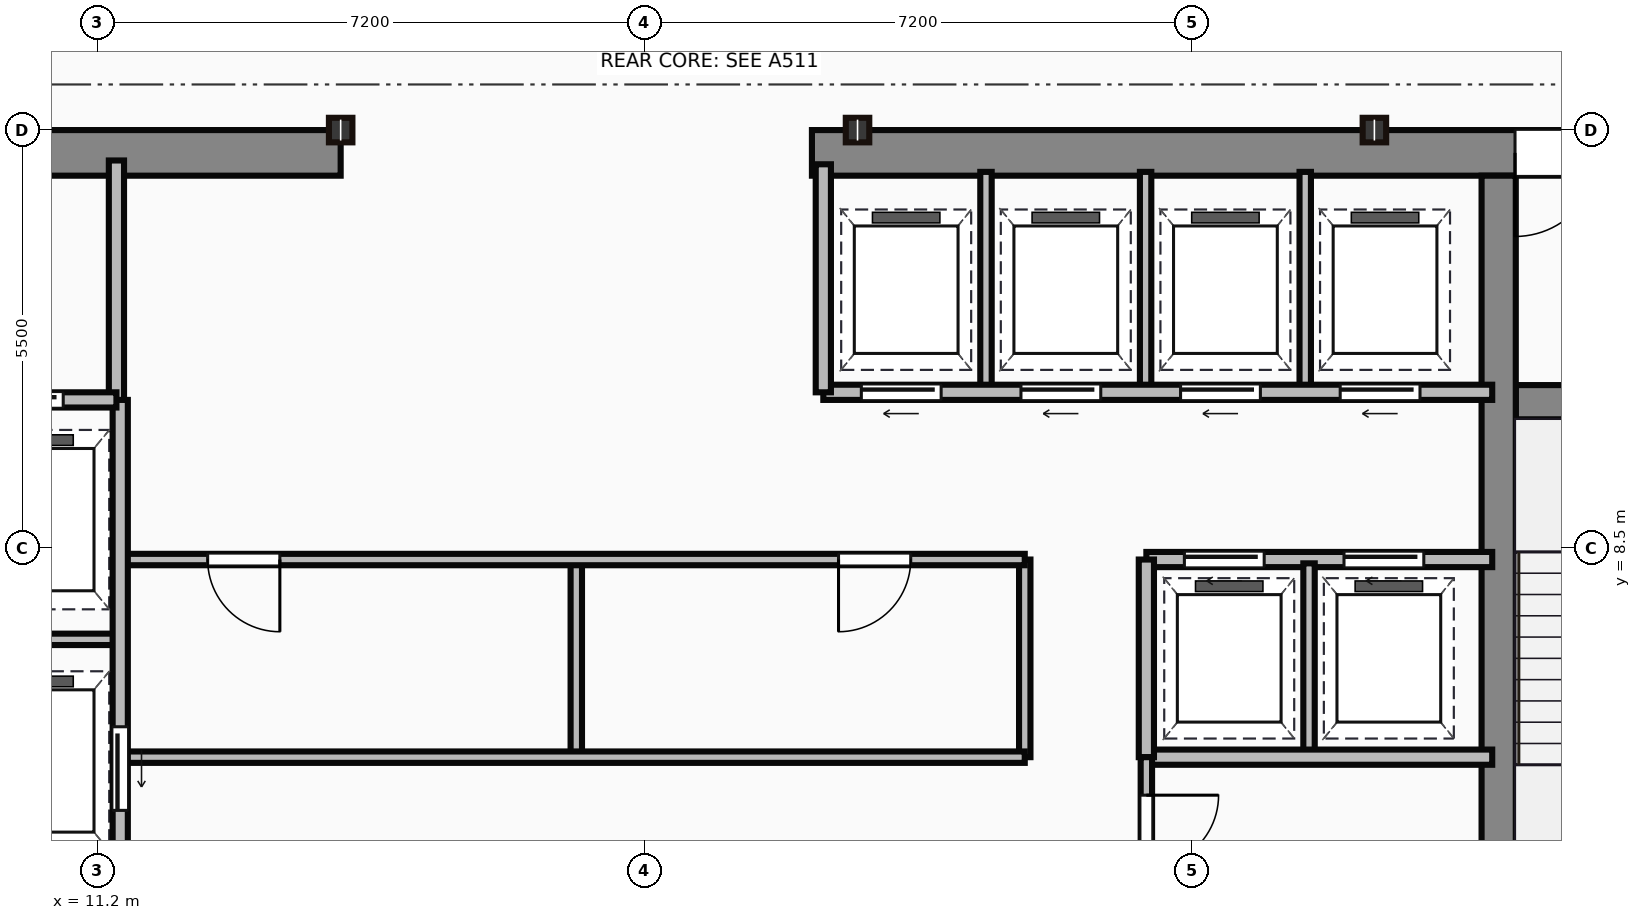
"""IFC4 building model, lengths in metres.
Left out: names, types, materials, properties, quantities, classifications, styles, units other than length and angle.
Written with IfcOpenShell. Run it as: python <this file> out.ifc"""

import sys

from ifc_helpers import new_model, si_unit, direction, frame, frame_2d, origin, origin_2d, place, context, subcontext, project, spatial, rectangle, i_section, extrude, source, transform, mapped, element, fill, save


model = new_model("IFC4")
c1 = context("Model", 3, precision=1e-05, world=origin(), true_north=direction((0.0, 1.0)))
c2 = subcontext(c1, "Body", "Model", "MODEL_VIEW")
j1 = project(units=[si_unit("LENGTHUNIT", "METRE"), si_unit("PLANEANGLEUNIT", "RADIAN")], contexts=[c1])
p1 = place(None, origin())
s1 = spatial("IfcSite", under=j1, at=p1, CompositionType="ELEMENT")
p2 = place(p1, origin())
s2 = spatial("IfcBuilding", under=s1, at=p2, CompositionType="ELEMENT")
p3 = place(p2, frame((0.0, 0.0, 266.1)))
s3 = spatial("IfcBuildingStorey", under=s2, at=p3, CompositionType="ELEMENT", Elevation=266.1)
m1 = source(origin(), c2, "Body", "SweptSolid", [
    extrude(rectangle(XDim=9.1, YDim=0.6, at=frame_2d((4.55, 0.0))), origin(), (0.0, 0.0, 1.0), 3.65),
])
p4 = place(p3, frame((5.3, 13.7, 0.0), z_axis=(0.0, 0.0, 1.0), x_axis=(1.0, 0.0, 0.0)))
e1 = element("IfcWall", 1, at=p4, inside=s3, PredefinedType="SHEAR", context=c2, shape_type="MappedRepresentation", body=[
    mapped(m1, transform((0.0, 0.0, 0.0))),
])
p5 = place(p4, frame((4.1, 0.0, 0.0)))
e2 = element("IfcOpeningElement", 2, at=p5, cuts=e1, PredefinedType="OPENING", context=c2, shape_type="SweptSolid", body=[
    extrude(rectangle(XDim=1.1, YDim=2.15, at=frame_2d((0.55, 1.075))), frame((0.0, 0.31, 0.0), z_axis=(0.0, -1.0, 0.0), x_axis=(1.0, 0.0, 0.0)), (0.0, 0.0, 1.0), 0.62),
])
m2 = source(origin(), c2, "Body", "SweptSolid", [
    extrude(rectangle(XDim=12.6, YDim=0.6, at=frame_2d((6.3, 0.0))), origin(), (0.0, 0.0, 1.0), 3.65),
])
p6 = place(p3, frame((20.6, 13.7, 0.0), z_axis=(0.0, 0.0, 1.0), x_axis=(1.0, 0.0, 0.0)))
e3 = element("IfcWall", 3, at=p6, inside=s3, PredefinedType="SHEAR", context=c2, shape_type="MappedRepresentation", body=[
    mapped(m2, transform((0.0, 0.0, 0.0))),
])
p7 = place(p6, frame((9.25, 0.0, 0.0)))
e4 = element("IfcOpeningElement", 4, at=p7, cuts=e3, PredefinedType="OPENING", context=c2, shape_type="SweptSolid", body=[
    extrude(rectangle(XDim=1.1, YDim=2.15, at=frame_2d((0.55, 1.075))), frame((0.0, 0.31, 0.0), z_axis=(0.0, -1.0, 0.0), x_axis=(1.0, 0.0, 0.0)), (0.0, 0.0, 1.0), 0.62),
])
m3 = source(origin(), c2, "Body", "SweptSolid", [
    extrude(rectangle(XDim=12.5, YDim=0.45, at=frame_2d((6.25, 0.0))), origin(), (0.0, 0.0, 1.0), 3.65),
])
p8 = place(p3, frame((29.635, 0.9, 0.0), z_axis=(0.0, 0.0, 1.0), x_axis=(0.0, 1.0, 0.0)))
e5 = element("IfcWall", 5, at=p8, inside=s3, PredefinedType="SHEAR", context=c2, shape_type="MappedRepresentation", body=[
    mapped(m3, transform((0.0, 0.0, 0.0))),
])
m4 = source(origin(), c2, "Body", "SweptSolid", [
    extrude(rectangle(XDim=3.39, YDim=0.45, at=frame_2d((1.695, 0.0))), origin(), (0.0, 0.0, 1.0), 3.65),
])
p9 = place(p3, frame((29.86, 10.42, 0.0), z_axis=(0.0, 0.0, 1.0), x_axis=(1.0, 0.0, 0.0)))
e6 = element("IfcWall", 6, at=p9, inside=s3, PredefinedType="SHEAR", context=c2, shape_type="MappedRepresentation", body=[
    mapped(m4, transform((0.0, 0.0, 0.0))),
])
p10 = place(p9, frame((1.1, 0.0, 0.0)))
e7 = element("IfcOpeningElement", 7, at=p10, cuts=e6, PredefinedType="OPENING", context=c2, shape_type="SweptSolid", body=[
    extrude(rectangle(XDim=1.1, YDim=2.15, at=frame_2d((0.55, 1.075))), frame((0.0, 0.235, 0.0), z_axis=(0.0, -1.0, 0.0), x_axis=(1.0, 0.0, 0.0)), (0.0, 0.0, 1.0), 0.47),
])
m5 = source(origin(), c2, "Body", "SweptSolid", [
    extrude(i_section(OverallWidth=0.309, OverallDepth=0.323, WebThickness=0.014, FlangeThickness=0.023, at=origin_2d()), origin(), (0.0, 0.0, 1.0), 3.65),
])
for number, where, z_axis, x_axis in (
    (8, (14.4, 14.0, 0.0), (0.0, 0.0, 1.0), (1.0, 0.0, 0.0)),
    (9, (21.2, 14.0, 0.0), (0.0, 0.0, 1.0), (1.0, 0.0, 0.0)),
    (10, (28.0, 14.0, 0.0), (0.0, 0.0, 1.0), (1.0, 0.0, 0.0)),
):
    element("IfcColumn", number, at=place(p3, frame(where, z_axis=z_axis, x_axis=x_axis)), inside=s3, PredefinedType="COLUMN", context=c2, shape_type="MappedRepresentation", body=[
        mapped(m5, transform((0.0, 0.0, 0.0))),
    ])
m6 = source(origin(), c2, "Body", "SweptSolid", [
    extrude(rectangle(XDim=3.18, YDim=0.2, at=frame_2d((1.59, 0.0))), origin(), (0.0, 0.0, 1.0), 3.4),
])
p11 = place(p3, frame((11.45, 10.42, 0.0), z_axis=(0.0, 0.0, 1.0), x_axis=(0.0, 1.0, 0.0)))
e11 = element("IfcWall", 11, at=p11, inside=s3, PredefinedType="PARTITIONING", context=c2, shape_type="MappedRepresentation", body=[
    mapped(m6, transform((0.0, 0.0, 0.0))),
])
m7 = source(origin(), c2, "Body", "SweptSolid", [
    extrude(rectangle(XDim=2.35, YDim=0.2, at=frame_2d((1.175, 0.0))), origin(), (0.0, 0.0, 1.0), 3.4),
])
p12 = place(p3, frame((9.1, 10.45, 0.0), z_axis=(0.0, 0.0, 1.0), x_axis=(1.0, 0.0, 0.0)))
e12 = element("IfcWall", 12, at=p12, inside=s3, PredefinedType="PARTITIONING", context=c2, shape_type="MappedRepresentation", body=[
    mapped(m7, transform((0.0, 0.0, 0.0))),
])
p13 = place(p12, frame((0.55, 0.0, 0.0)))
e13 = element("IfcOpeningElement", 13, at=p13, cuts=e12, PredefinedType="OPENING", context=c2, shape_type="SweptSolid", body=[
    extrude(rectangle(XDim=1.1, YDim=2.15, at=frame_2d((0.55, 1.075))), frame((0.0, 0.11, 0.0), z_axis=(0.0, -1.0, 0.0), x_axis=(1.0, 0.0, 0.0)), (0.0, 0.0, 1.0), 0.22),
])
m8 = source(origin(), c2, "Body", "SweptSolid", [
    extrude(rectangle(XDim=9.6, YDim=0.2, at=frame_2d((4.8, 0.0))), origin(), (0.0, 0.0, 1.0), 3.4),
])
p14 = place(p3, frame((11.5, 0.85, 0.0), z_axis=(0.0, 0.0, 1.0), x_axis=(0.0, 1.0, 0.0)))
e14 = element("IfcWall", 14, at=p14, inside=s3, PredefinedType="PARTITIONING", context=c2, shape_type="MappedRepresentation", body=[
    mapped(m8, transform((0.0, 0.0, 0.0))),
])
p15 = place(p14, frame((4.2, 0.0, 0.0)))
e15 = element("IfcOpeningElement", 15, at=p15, cuts=e14, PredefinedType="OPENING", context=c2, shape_type="SweptSolid", body=[
    extrude(rectangle(XDim=1.1, YDim=2.15, at=frame_2d((0.55, 1.075))), frame((0.0, 0.11, 0.0), z_axis=(0.0, -1.0, 0.0), x_axis=(1.0, 0.0, 0.0)), (0.0, 0.0, 1.0), 0.22),
])
p16 = place(p14, frame((0.9, 0.0, 0.0)))
e16 = element("IfcOpeningElement", 16, at=p16, cuts=e14, PredefinedType="OPENING", context=c2, shape_type="SweptSolid", body=[
    extrude(rectangle(XDim=1.2, YDim=2.15, at=frame_2d((0.6, 1.075))), frame((0.0, 0.11, 0.0), z_axis=(0.0, -1.0, 0.0), x_axis=(1.0, 0.0, 0.0)), (0.0, 0.0, 1.0), 0.22),
])
m9 = source(origin(), c2, "Body", "SweptSolid", [
    extrude(rectangle(XDim=2.4, YDim=0.15, at=frame_2d((1.2, 0.0))), origin(), (0.0, 0.0, 1.0), 3.4),
])
p17 = place(p3, frame((9.1, 7.3, 0.0), z_axis=(0.0, 0.0, 1.0), x_axis=(1.0, 0.0, 0.0)))
e17 = element("IfcWall", 17, at=p17, inside=s3, PredefinedType="PARTITIONING", context=c2, shape_type="MappedRepresentation", body=[
    mapped(m9, transform((0.0, 0.0, 0.0))),
])
m10 = source(origin(), c2, "Body", "SweptSolid", [
    extrude(rectangle(XDim=11.85, YDim=0.15, at=frame_2d((5.925, 0.0))), origin(), (0.0, 0.0, 1.0), 3.4),
])
p18 = place(p3, frame((11.55, 5.75, 0.0), z_axis=(0.0, 0.0, 1.0), x_axis=(1.0, 0.0, 0.0)))
e18 = element("IfcWall", 18, at=p18, inside=s3, PredefinedType="PARTITIONING", context=c2, shape_type="MappedRepresentation", body=[
    mapped(m10, transform((0.0, 0.0, 0.0))),
])
p19 = place(p3, frame((11.55, 8.35, 0.0), z_axis=(0.0, 0.0, 1.0), x_axis=(1.0, 0.0, 0.0)))
e19 = element("IfcWall", 19, at=p19, inside=s3, PredefinedType="PARTITIONING", context=c2, shape_type="MappedRepresentation", body=[
    mapped(m10, transform((0.0, 0.0, 0.0))),
])
p20 = place(p19, frame((1.1, 0.0, 0.0)))
e20 = element("IfcOpeningElement", 20, at=p20, cuts=e19, PredefinedType="OPENING", context=c2, shape_type="SweptSolid", body=[
    extrude(rectangle(XDim=0.95, YDim=2.15, at=frame_2d((0.475, 1.075))), frame((0.0, 0.085, 0.0), z_axis=(0.0, -1.0, 0.0), x_axis=(1.0, 0.0, 0.0)), (0.0, 0.0, 1.0), 0.17),
])
p21 = place(p19, frame((9.4, 0.0, 0.0)))
e21 = element("IfcOpeningElement", 21, at=p21, cuts=e19, PredefinedType="OPENING", context=c2, shape_type="SweptSolid", body=[
    extrude(rectangle(XDim=0.95, YDim=2.15, at=frame_2d((0.475, 1.075))), frame((0.0, 0.085, 0.0), z_axis=(0.0, -1.0, 0.0), x_axis=(1.0, 0.0, 0.0)), (0.0, 0.0, 1.0), 0.17),
])
m11 = source(origin(), c2, "Body", "SweptSolid", [
    extrude(rectangle(XDim=2.6, YDim=0.15, at=frame_2d((1.3, 0.0))), origin(), (0.0, 0.0, 1.0), 3.4),
])
p22 = place(p3, frame((23.4, 5.75, 0.0), z_axis=(0.0, 0.0, 1.0), x_axis=(0.0, 1.0, 0.0)))
e22 = element("IfcWall", 22, at=p22, inside=s3, PredefinedType="PARTITIONING", context=c2, shape_type="MappedRepresentation", body=[
    mapped(m11, transform((0.0, 0.0, 0.0))),
])
m12 = source(origin(), c2, "Body", "SweptSolid", [
    extrude(rectangle(XDim=2.5, YDim=0.15, at=frame_2d((1.25, 0.0))), origin(), (0.0, 0.0, 1.0), 3.4),
])
p23 = place(p3, frame((17.5, 5.8, 0.0), z_axis=(0.0, 0.0, 1.0), x_axis=(0.0, 1.0, 0.0)))
e23 = element("IfcWall", 23, at=p23, inside=s3, PredefinedType="PARTITIONING", context=c2, shape_type="MappedRepresentation", body=[
    mapped(m12, transform((0.0, 0.0, 0.0))),
])
m13 = source(origin(), c2, "Body", "SweptSolid", [
    extrude(rectangle(XDim=8.8, YDim=0.2, at=frame_2d((4.4, 0.0))), origin(), (0.0, 0.0, 1.0), 3.4),
])
p24 = place(p3, frame((20.75, 10.55, 0.0), z_axis=(0.0, 0.0, 1.0), x_axis=(1.0, 0.0, 0.0)))
e24 = element("IfcWall", 24, at=p24, inside=s3, PredefinedType="PARTITIONING", context=c2, shape_type="MappedRepresentation", body=[
    mapped(m13, transform((0.0, 0.0, 0.0))),
])
p25 = place(p24, frame((0.5, 0.0, 0.0)))
e25 = element("IfcOpeningElement", 25, at=p25, cuts=e24, PredefinedType="OPENING", context=c2, shape_type="SweptSolid", body=[
    extrude(rectangle(XDim=1.05, YDim=2.15, at=frame_2d((0.525, 1.075))), frame((0.0, 0.11, 0.0), z_axis=(0.0, -1.0, 0.0), x_axis=(1.0, 0.0, 0.0)), (0.0, 0.0, 1.0), 0.22),
])
p26 = place(p24, frame((2.6, 0.0, 0.0)))
e26 = element("IfcOpeningElement", 26, at=p26, cuts=e24, PredefinedType="OPENING", context=c2, shape_type="SweptSolid", body=[
    extrude(rectangle(XDim=1.05, YDim=2.15, at=frame_2d((0.525, 1.075))), frame((0.0, 0.11, 0.0), z_axis=(0.0, -1.0, 0.0), x_axis=(1.0, 0.0, 0.0)), (0.0, 0.0, 1.0), 0.22),
])
p27 = place(p24, frame((4.7, 0.0, 0.0)))
e27 = element("IfcOpeningElement", 27, at=p27, cuts=e24, PredefinedType="OPENING", context=c2, shape_type="SweptSolid", body=[
    extrude(rectangle(XDim=1.05, YDim=2.15, at=frame_2d((0.525, 1.075))), frame((0.0, 0.11, 0.0), z_axis=(0.0, -1.0, 0.0), x_axis=(1.0, 0.0, 0.0)), (0.0, 0.0, 1.0), 0.22),
])
p28 = place(p24, frame((6.8, 0.0, 0.0)))
e28 = element("IfcOpeningElement", 28, at=p28, cuts=e24, PredefinedType="OPENING", context=c2, shape_type="SweptSolid", body=[
    extrude(rectangle(XDim=1.05, YDim=2.15, at=frame_2d((0.525, 1.075))), frame((0.0, 0.11, 0.0), z_axis=(0.0, -1.0, 0.0), x_axis=(1.0, 0.0, 0.0)), (0.0, 0.0, 1.0), 0.22),
])
m14 = source(origin(), c2, "Body", "SweptSolid", [
    extrude(rectangle(XDim=3.0, YDim=0.2, at=frame_2d((1.5, 0.0))), origin(), (0.0, 0.0, 1.0), 3.4),
])
p29 = place(p3, frame((20.75, 10.55, 0.0), z_axis=(0.0, 0.0, 1.0), x_axis=(0.0, 1.0, 0.0)))
e29 = element("IfcWall", 29, at=p29, inside=s3, PredefinedType="PARTITIONING", context=c2, shape_type="MappedRepresentation", body=[
    mapped(m14, transform((0.0, 0.0, 0.0))),
])
m15 = source(origin(), c2, "Body", "SweptSolid", [
    extrude(rectangle(XDim=2.85, YDim=0.15, at=frame_2d((1.425, 0.0))), origin(), (0.0, 0.0, 1.0), 3.4),
])
for number, where, z_axis, x_axis in (
    (30, (22.89, 10.6, 0.0), (0.0, 0.0, 1.0), (0.0, 1.0, 0.0)),
    (31, (24.99, 10.6, 0.0), (0.0, 0.0, 1.0), (0.0, 1.0, 0.0)),
    (32, (27.09, 10.6, 0.0), (0.0, 0.0, 1.0), (0.0, 1.0, 0.0)),
):
    element("IfcWall", number, at=place(p3, frame(where, z_axis=z_axis, x_axis=x_axis)), inside=s3, PredefinedType="PARTITIONING", context=c2, shape_type="MappedRepresentation", body=[
        mapped(m15, transform((0.0, 0.0, 0.0))),
    ])
m16 = source(origin(), c2, "Body", "SweptSolid", [
    extrude(rectangle(XDim=4.55, YDim=0.2, at=frame_2d((2.275, 0.0))), origin(), (0.0, 0.0, 1.0), 3.4),
])
p30 = place(p3, frame((25.0, 8.35, 0.0), z_axis=(0.0, 0.0, 1.0), x_axis=(1.0, 0.0, 0.0)))
e33 = element("IfcWall", 33, at=p30, inside=s3, PredefinedType="PARTITIONING", context=c2, shape_type="MappedRepresentation", body=[
    mapped(m16, transform((0.0, 0.0, 0.0))),
])
p31 = place(p30, frame((0.5, 0.0, 0.0)))
e34 = element("IfcOpeningElement", 34, at=p31, cuts=e33, PredefinedType="OPENING", context=c2, shape_type="SweptSolid", body=[
    extrude(rectangle(XDim=1.05, YDim=2.15, at=frame_2d((0.525, 1.075))), frame((0.0, 0.11, 0.0), z_axis=(0.0, -1.0, 0.0), x_axis=(1.0, 0.0, 0.0)), (0.0, 0.0, 1.0), 0.22),
])
p32 = place(p30, frame((2.6, 0.0, 0.0)))
e35 = element("IfcOpeningElement", 35, at=p32, cuts=e33, PredefinedType="OPENING", context=c2, shape_type="SweptSolid", body=[
    extrude(rectangle(XDim=1.05, YDim=2.15, at=frame_2d((0.525, 1.075))), frame((0.0, 0.11, 0.0), z_axis=(0.0, -1.0, 0.0), x_axis=(1.0, 0.0, 0.0)), (0.0, 0.0, 1.0), 0.22),
])
p33 = place(p3, frame((25.0, 5.75, 0.0), z_axis=(0.0, 0.0, 1.0), x_axis=(1.0, 0.0, 0.0)))
e36 = element("IfcWall", 36, at=p33, inside=s3, PredefinedType="PARTITIONING", context=c2, shape_type="MappedRepresentation", body=[
    mapped(m16, transform((0.0, 0.0, 0.0))),
])
m17 = source(origin(), c2, "Body", "SweptSolid", [
    extrude(rectangle(XDim=2.6, YDim=0.2, at=frame_2d((1.3, 0.0))), origin(), (0.0, 0.0, 1.0), 3.4),
])
p34 = place(p3, frame((25.0, 5.75, 0.0), z_axis=(0.0, 0.0, 1.0), x_axis=(0.0, 1.0, 0.0)))
e37 = element("IfcWall", 37, at=p34, inside=s3, PredefinedType="PARTITIONING", context=c2, shape_type="MappedRepresentation", body=[
    mapped(m17, transform((0.0, 0.0, 0.0))),
])
p35 = place(p3, frame((27.14, 5.8, 0.0), z_axis=(0.0, 0.0, 1.0), x_axis=(0.0, 1.0, 0.0)))
e38 = element("IfcWall", 38, at=p35, inside=s3, PredefinedType="PARTITIONING", context=c2, shape_type="MappedRepresentation", body=[
    mapped(m12, transform((0.0, 0.0, 0.0))),
])
m18 = source(origin(), c2, "Body", "SweptSolid", [
    extrude(rectangle(XDim=4.9, YDim=0.15, at=frame_2d((2.45, 0.0))), origin(), (0.0, 0.0, 1.0), 3.4),
])
p36 = place(p3, frame((25.0, 0.85, 0.0), z_axis=(0.0, 0.0, 1.0), x_axis=(0.0, 1.0, 0.0)))
e39 = element("IfcWall", 39, at=p36, inside=s3, PredefinedType="PARTITIONING", context=c2, shape_type="MappedRepresentation", body=[
    mapped(m18, transform((0.0, 0.0, 0.0))),
])
p37 = place(p36, frame((1.8, 0.0, 0.0)))
e40 = element("IfcOpeningElement", 40, at=p37, cuts=e39, PredefinedType="OPENING", context=c2, shape_type="SweptSolid", body=[
    extrude(rectangle(XDim=0.95, YDim=2.15, at=frame_2d((0.475, 1.075))), frame((0.0, 0.085, 0.0), z_axis=(0.0, -1.0, 0.0), x_axis=(1.0, 0.0, 0.0)), (0.0, 0.0, 1.0), 0.17),
])
p38 = place(p36, frame((3.45, 0.0, 0.0)))
e41 = element("IfcOpeningElement", 41, at=p38, cuts=e39, PredefinedType="OPENING", context=c2, shape_type="SweptSolid", body=[
    extrude(rectangle(XDim=0.95, YDim=2.15, at=frame_2d((0.475, 1.075))), frame((0.0, 0.085, 0.0), z_axis=(0.0, -1.0, 0.0), x_axis=(1.0, 0.0, 0.0)), (0.0, 0.0, 1.0), 0.17),
])
m19 = source(origin(), c2, "Body", "SweptSolid", [
    extrude(rectangle(XDim=1.1, YDim=2.15, at=frame_2d((0.55, 1.075))), frame((0.0, 0.025, 0.0), z_axis=(0.0, -1.0, 0.0), x_axis=(1.0, 0.0, 0.0)), (0.0, 0.0, 1.0), 0.05),
])
p39 = place(p7, origin())
e42 = element("IfcDoor", 42, at=p39, inside=s3, OperationType="SINGLE_SWING_LEFT", PredefinedType="DOOR", context=c2, shape_type="MappedRepresentation", body=[
    mapped(m19, transform((0.0, 0.0, 0.0))),
])
fill(e4, e42)
p40 = place(p13, origin())
e43 = element("IfcDoor", 43, at=p40, inside=s3, OperationType="SLIDING_TO_LEFT", PredefinedType="DOOR", context=c2, shape_type="MappedRepresentation", body=[
    mapped(m19, transform((0.0, 0.0, 0.0))),
])
fill(e13, e43)
p41 = place(p15, frame((1.1, 0.0, 0.0), z_axis=(0.0, 0.0, 1.0), x_axis=(-1.0, 0.0, 0.0)))
e44 = element("IfcDoor", 44, at=p41, inside=s3, OperationType="SLIDING_TO_LEFT", PredefinedType="DOOR", context=c2, shape_type="MappedRepresentation", body=[
    mapped(m19, transform((0.0, 0.0, 0.0))),
])
fill(e15, e44)
m20 = source(origin(), c2, "Body", "SweptSolid", [
    extrude(rectangle(XDim=0.95, YDim=2.15, at=frame_2d((0.475, 1.075))), frame((0.0, 0.025, 0.0), z_axis=(0.0, -1.0, 0.0), x_axis=(1.0, 0.0, 0.0)), (0.0, 0.0, 1.0), 0.05),
])
p42 = place(p20, origin())
e45 = element("IfcDoor", 45, at=p42, inside=s3, OperationType="SINGLE_SWING_RIGHT", PredefinedType="DOOR", context=c2, shape_type="MappedRepresentation", body=[
    mapped(m20, transform((0.0, 0.0, 0.0))),
])
fill(e20, e45)
p43 = place(p21, origin())
e46 = element("IfcDoor", 46, at=p43, inside=s3, OperationType="SINGLE_SWING_LEFT", PredefinedType="DOOR", context=c2, shape_type="MappedRepresentation", body=[
    mapped(m20, transform((0.0, 0.0, 0.0))),
])
fill(e21, e46)
m21 = source(origin(), c2, "Body", "SweptSolid", [
    extrude(rectangle(XDim=1.05, YDim=2.15, at=frame_2d((0.525, 1.075))), frame((0.0, 0.025, 0.0), z_axis=(0.0, -1.0, 0.0), x_axis=(1.0, 0.0, 0.0)), (0.0, 0.0, 1.0), 0.05),
])
p44 = place(p25, frame((1.05, 0.0, 0.0), z_axis=(0.0, 0.0, 1.0), x_axis=(-1.0, 0.0, 0.0)))
e47 = element("IfcDoor", 47, at=p44, inside=s3, OperationType="SLIDING_TO_LEFT", PredefinedType="DOOR", context=c2, shape_type="MappedRepresentation", body=[
    mapped(m21, transform((0.0, 0.0, 0.0))),
])
fill(e25, e47)
p45 = place(p26, frame((1.05, 0.0, 0.0), z_axis=(0.0, 0.0, 1.0), x_axis=(-1.0, 0.0, 0.0)))
e48 = element("IfcDoor", 48, at=p45, inside=s3, OperationType="SLIDING_TO_LEFT", PredefinedType="DOOR", context=c2, shape_type="MappedRepresentation", body=[
    mapped(m21, transform((0.0, 0.0, 0.0))),
])
fill(e26, e48)
p46 = place(p27, frame((1.05, 0.0, 0.0), z_axis=(0.0, 0.0, 1.0), x_axis=(-1.0, 0.0, 0.0)))
e49 = element("IfcDoor", 49, at=p46, inside=s3, OperationType="SLIDING_TO_LEFT", PredefinedType="DOOR", context=c2, shape_type="MappedRepresentation", body=[
    mapped(m21, transform((0.0, 0.0, 0.0))),
])
fill(e27, e49)
p47 = place(p28, frame((1.05, 0.0, 0.0), z_axis=(0.0, 0.0, 1.0), x_axis=(-1.0, 0.0, 0.0)))
e50 = element("IfcDoor", 50, at=p47, inside=s3, OperationType="SLIDING_TO_LEFT", PredefinedType="DOOR", context=c2, shape_type="MappedRepresentation", body=[
    mapped(m21, transform((0.0, 0.0, 0.0))),
])
fill(e28, e50)
p48 = place(p31, origin())
e51 = element("IfcDoor", 51, at=p48, inside=s3, OperationType="SLIDING_TO_LEFT", PredefinedType="DOOR", context=c2, shape_type="MappedRepresentation", body=[
    mapped(m21, transform((0.0, 0.0, 0.0))),
])
fill(e34, e51)
p49 = place(p32, origin())
e52 = element("IfcDoor", 52, at=p49, inside=s3, OperationType="SLIDING_TO_LEFT", PredefinedType="DOOR", context=c2, shape_type="MappedRepresentation", body=[
    mapped(m21, transform((0.0, 0.0, 0.0))),
])
fill(e35, e52)
p50 = place(p38, origin())
e53 = element("IfcDoor", 53, at=p50, inside=s3, OperationType="SINGLE_SWING_RIGHT", PredefinedType="DOOR", context=c2, shape_type="MappedRepresentation", body=[
    mapped(m20, transform((0.0, 0.0, 0.0))),
])
fill(e41, e53)
save(model, sys.argv[1])
